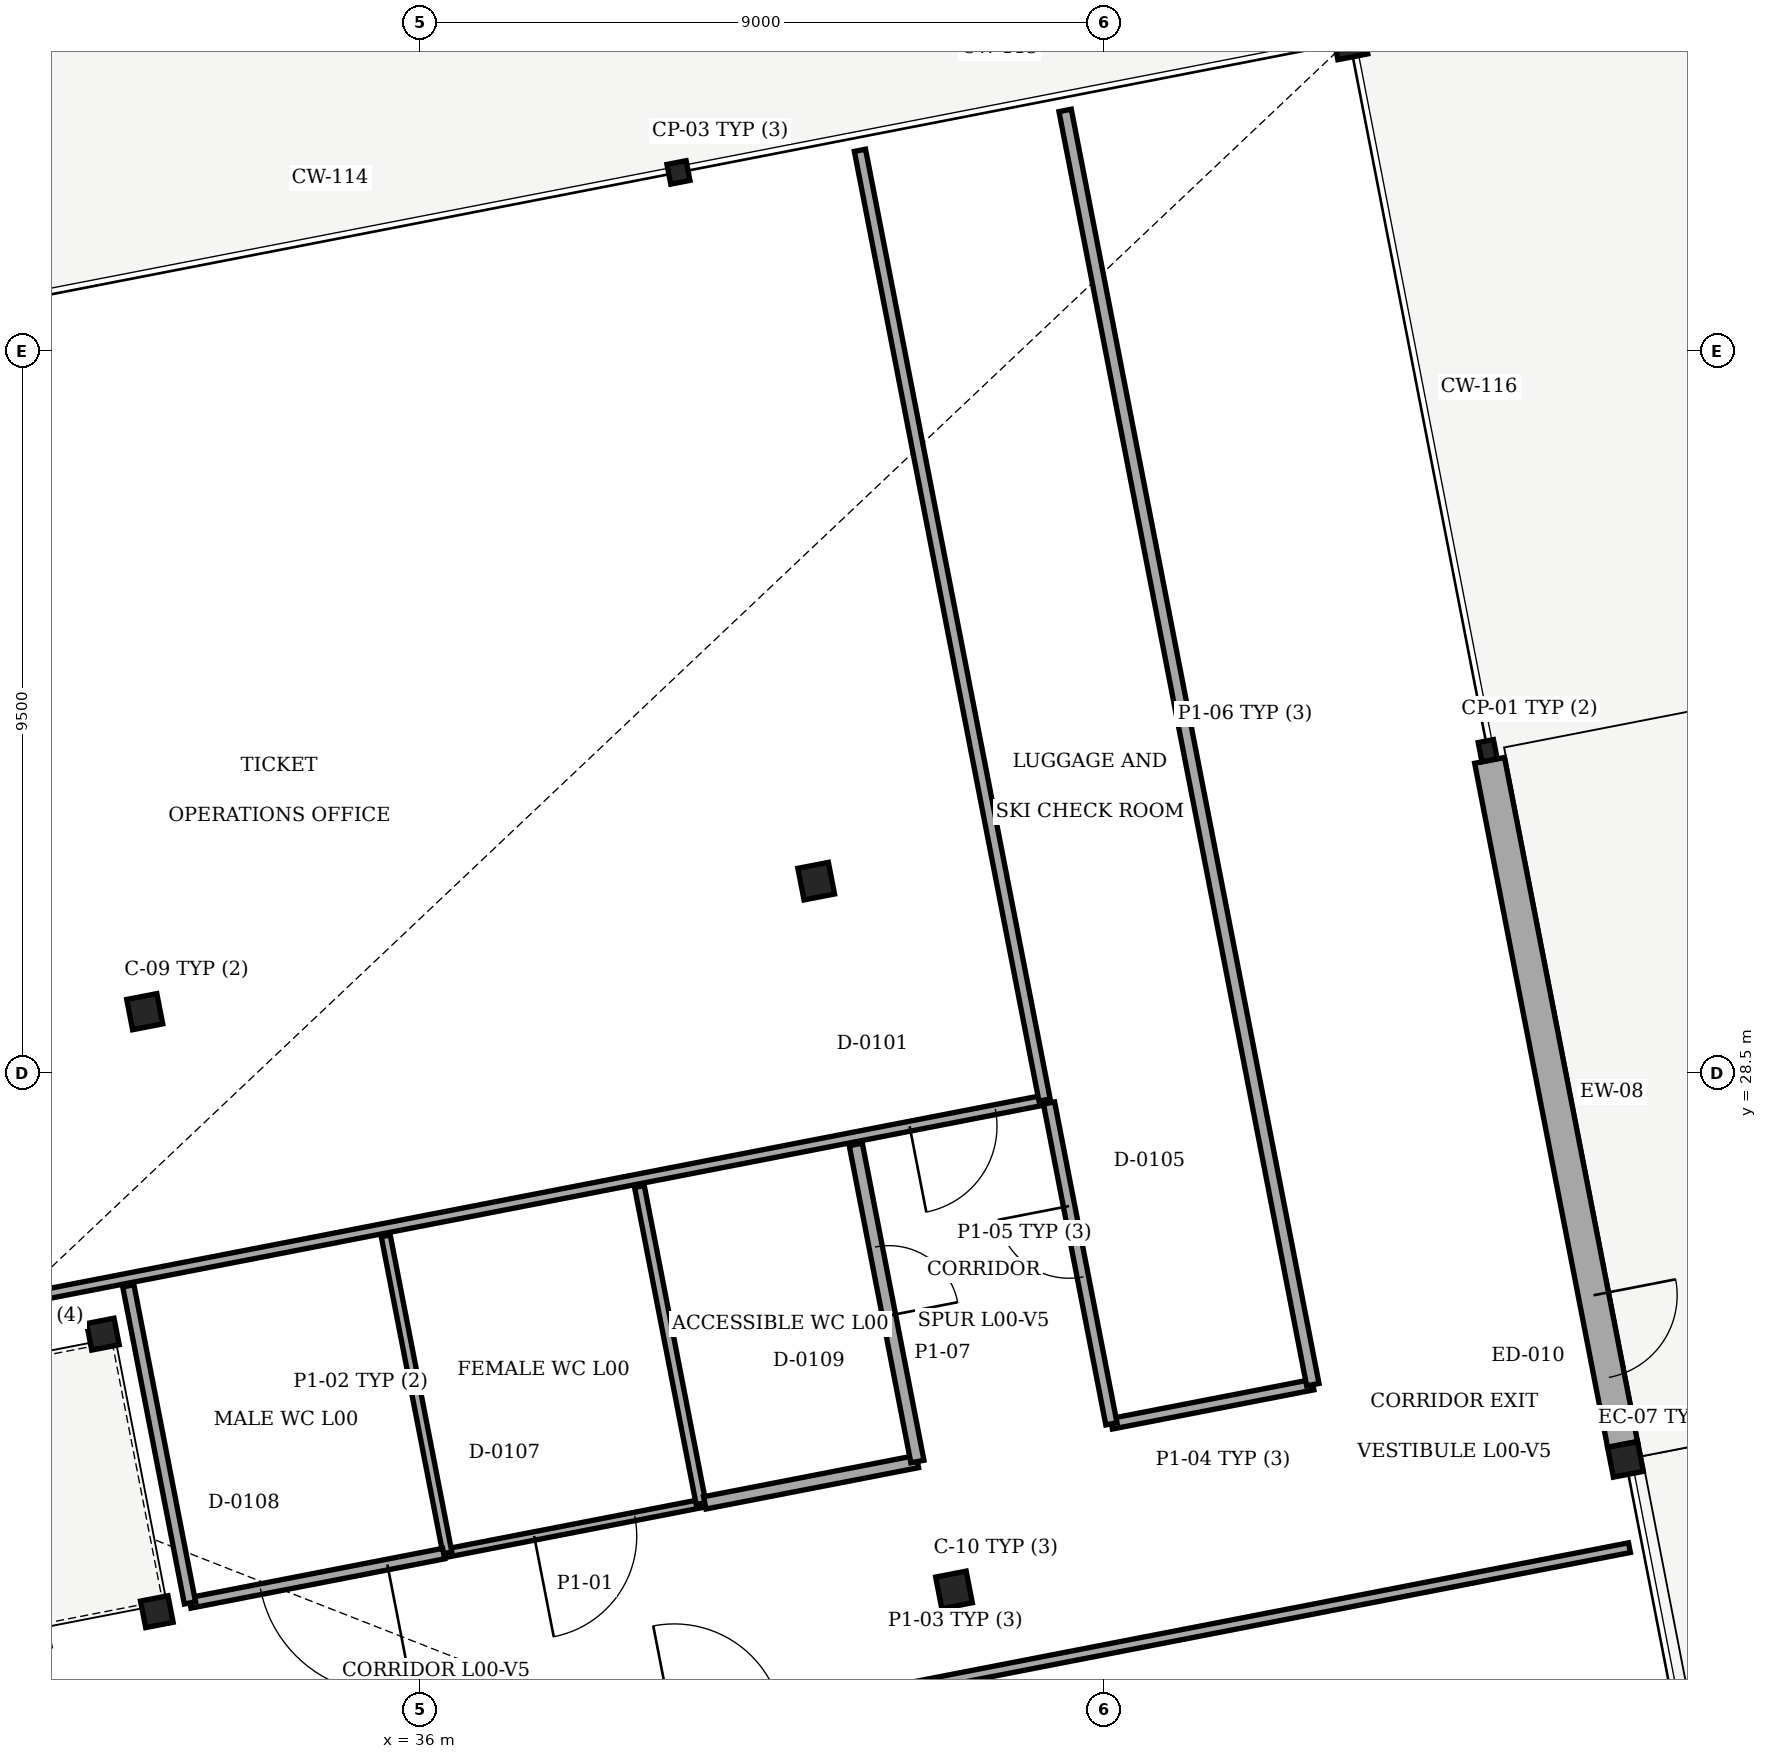
"""IFC4 building model, lengths in metres.
Left out: names, types, materials, properties, quantities, classifications, styles, units other than length and angle.
Written with IfcOpenShell. Run it as: python <this file> out.ifc"""

import sys

from ifc_helpers import new_model, si_unit, direction, frame, frame_2d, origin, origin_with_axes, origin_2d, place, context, subcontext, project, spatial, rectangle, i_section, extrude, element, fill, save


model = new_model("IFC4")
c1 = context("Model", 3, precision=1e-05, world=origin(), true_north=direction((0.0, 1.0)))
c2 = subcontext(c1, "Body", "Model", "MODEL_VIEW")
j1 = project(units=[si_unit("LENGTHUNIT", "METRE"), si_unit("PLANEANGLEUNIT", "RADIAN")], contexts=[c1])
p1 = place(None, origin())
s1 = spatial("IfcSite", under=j1, at=p1, CompositionType="ELEMENT")
p2 = place(p1, origin())
s2 = spatial("IfcBuilding", under=s1, at=p2, CompositionType="ELEMENT")
p3 = place(p2, origin())
s3 = spatial("IfcBuildingStorey", under=s2, at=p3, CompositionType="ELEMENT", Elevation=0.0)
p4 = place(p3, frame((32.379, 29.303, 0.0), z_axis=(0.0, 0.0, 1.0), x_axis=(0.981627183448, 0.190808995377, 0.0)))
e1 = element("IfcColumn", 1, at=p4, inside=s3, PredefinedType="COLUMN", context=c2, shape_type="SweptSolid", body=[
    extrude(i_section(OverallWidth=0.404, OverallDepth=0.406, WebThickness=0.027, FlangeThickness=0.044, FilletRadius=0.015, at=origin_2d()), origin(), (0.0, 0.0, 1.0), 4.8),
])
for number, where, z_axis, x_axis in (
    (2, (43.026, 21.695, 0.0), (0.0, 0.0, 1.0), (0.982, 0.191, 0.0)),
    (3, (41.213, 31.02, 0.0), (0.0, 0.0, 1.0), (0.982, 0.191, 0.0)),
):
    element("IfcColumn", number, at=place(p3, frame(where, z_axis=z_axis, x_axis=x_axis)), inside=s3, PredefinedType="COLUMN", context=c2, shape_type="SweptSolid", body=[
        extrude(i_section(OverallWidth=0.409, OverallDepth=0.424, WebThickness=0.033, FlangeThickness=0.052, FilletRadius=0.015, at=origin_2d()), origin(), (0.0, 0.0, 1.0), 4.8),
    ])
p5 = place(p3, frame((39.401, 40.345, 0.0), z_axis=(0.0, 0.0, 1.0), x_axis=(0.981627183448, 0.190808995377, 0.0)))
e4 = element("IfcColumn", 4, at=p5, inside=s3, PredefinedType="PILASTER", context=c2, shape_type="SweptSolid", body=[
    extrude(i_section(OverallWidth=0.257, OverallDepth=0.264, WebThickness=0.012, FlangeThickness=0.02, FilletRadius=0.009, at=origin_2d()), origin(), (0.0, 0.0, 1.0), 4.8),
])
p6 = place(p3, frame((51.861, 23.412, 0.0), z_axis=(0.0, 0.0, 1.0), x_axis=(0.981627183448, 0.190808995377, 0.0)))
e5 = element("IfcColumn", 5, at=p6, inside=s3, PredefinedType="COLUMN", context=c2, shape_type="SweptSolid", body=[
    extrude(i_section(OverallWidth=0.401, OverallDepth=0.399, WebThickness=0.025, FlangeThickness=0.04, FilletRadius=0.015, at=origin_2d()), origin(), (0.0, 0.0, 1.0), 4.8),
])
p7 = place(p3, frame((50.048, 32.737, 0.0), z_axis=(0.0, 0.0, 1.0), x_axis=(0.981627183448, 0.190808995377, 0.0)))
e6 = element("IfcColumn", 6, at=p7, inside=s3, PredefinedType="PILASTER", context=c2, shape_type="SweptSolid", body=[
    extrude(i_section(OverallWidth=0.204, OverallDepth=0.257, WebThickness=0.009, FlangeThickness=0.016, FilletRadius=0.009, at=origin_2d()), origin(), (0.0, 0.0, 1.0), 4.8),
])
p8 = place(p3, frame((48.235, 42.063, 0.0), z_axis=(0.0, 0.0, 1.0), x_axis=(0.981627183448, 0.190808995377, 0.0)))
e7 = element("IfcColumn", 7, at=p8, inside=s3, PredefinedType="COLUMN", context=c2, shape_type="SweptSolid", body=[
    extrude(i_section(OverallWidth=0.401, OverallDepth=0.399, WebThickness=0.025, FlangeThickness=0.04, FilletRadius=0.015, at=origin_2d()), origin(), (0.0, 0.0, 1.0), 4.8),
])
p9 = place(p3, frame((50.073, 32.609, 0.0), z_axis=(0.0, 0.0, 1.0), x_axis=(0.190802658427, -0.981628415205, 0.0)))
e8 = element("IfcWall", 8, at=p9, inside=s3, PredefinedType="SOLIDWALL", context=c2, shape_type="SweptSolid", body=[
    extrude(rectangle(XDim=9.168, YDim=0.4, at=frame_2d((4.584, 0.0))), origin(), (0.0, 0.0, 1.0), 3.4),
])
p10 = place(p9, frame((7.169, 0.0, 0.0)))
e9 = element("IfcOpeningElement", 9, at=p10, cuts=e8, PredefinedType="OPENING", context=c2, shape_type="SweptSolid", body=[
    extrude(rectangle(XDim=1.1, YDim=2.15, at=frame_2d((0.55, 1.075))), frame((0.0, 0.21, 0.0), z_axis=(0.0, -1.0, 0.0), x_axis=(1.0, 0.0, 0.0)), (0.0, 0.0, 1.0), 0.42),
])
for number, where, z_axis, x_axis in (
    (10, (32.538, 21.408, 0.0), (0.0, 0.0, 1.0), (0.982, 0.191, 0.0)),
    (11, (31.828, 25.06, 0.0), (0.0, 0.0, 1.0), (0.982, 0.191, 0.0)),
):
    element("IfcColumn", number, at=place(p3, frame(where, z_axis=z_axis, x_axis=x_axis)), inside=s3, PredefinedType="COLUMN", context=c2, shape_type="SweptSolid", body=[
        extrude(i_section(OverallWidth=0.368, OverallDepth=0.356, WebThickness=0.011, FlangeThickness=0.018, FilletRadius=0.015, at=origin_2d()), origin(), (0.0, 0.0, 1.0), 4.8),
    ])
p11 = place(p3, frame((44.218, 28.14, 0.0), z_axis=(0.0, 0.0, 1.0), x_axis=(-0.981627873079, -0.190805447496, 0.0)))
e12 = element("IfcWall", 12, at=p11, inside=s3, PredefinedType="PARTITIONING", context=c2, shape_type="SweptSolid", body=[
    extrude(rectangle(XDim=20.15, YDim=0.13, at=frame_2d((10.075, 0.0))), origin(), (0.0, 0.0, 1.0), 3.38),
])
p12 = place(p11, frame((0.659, 0.0, 0.0)))
e13 = element("IfcOpeningElement", 13, at=p12, cuts=e12, PredefinedType="OPENING", context=c2, shape_type="SweptSolid", body=[
    extrude(rectangle(XDim=1.15, YDim=2.15, at=frame_2d((0.575, 1.075))), frame((0.0, 0.075, 0.0), z_axis=(0.0, -1.0, 0.0), x_axis=(1.0, 0.0, 0.0)), (0.0, 0.0, 1.0), 0.15),
])
p13 = place(p3, frame((41.789, 40.636, 0.0), z_axis=(0.0, 0.0, 1.0), x_axis=(0.190806006341, -0.981627764453, 0.0)))
e14 = element("IfcWall", 14, at=p13, inside=s3, PredefinedType="PARTITIONING", context=c2, shape_type="SweptSolid", body=[
    extrude(rectangle(XDim=12.73, YDim=0.15, at=frame_2d((6.365, 0.0))), origin(), (0.0, 0.0, 1.0), 3.38),
])
p14 = place(p3, frame((34.46, 18.858, 0.0), z_axis=(0.0, 0.0, 1.0), x_axis=(0.981627322124, 0.190808281949, 0.0)))
e15 = element("IfcWall", 15, at=p14, inside=s3, PredefinedType="PARTITIONING", context=c2, shape_type="SweptSolid", body=[
    extrude(rectangle(XDim=17.78, YDim=0.13, at=frame_2d((8.89, 0.0))), origin(), (0.0, 0.0, 1.0), 3.38),
])
p15 = place(p14, frame((4.976, 0.0, 0.0)))
e16 = element("IfcOpeningElement", 16, at=p15, cuts=e15, PredefinedType="OPENING", context=c2, shape_type="SweptSolid", body=[
    extrude(rectangle(XDim=1.44, YDim=2.22, at=frame_2d((0.72, 1.11))), frame((0.0, 0.075, 0.0), z_axis=(0.0, -1.0, 0.0), x_axis=(1.0, 0.0, 0.0)), (0.0, 0.0, 1.0), 0.15),
])
p16 = place(p3, frame((47.747, 24.395, 0.0), z_axis=(0.0, 0.0, 1.0), x_axis=(-0.981630445883, -0.190792210834, 0.0)))
e17 = element("IfcWall", 17, at=p16, inside=s3, PredefinedType="PARTITIONING", context=c2, shape_type="SweptSolid", body=[
    extrude(rectangle(XDim=2.7, YDim=0.14, at=frame_2d((1.35, 0.0))), origin(), (0.0, 0.0, 1.0), 3.38),
])
p17 = place(p3, frame((45.097, 23.88, 0.0), z_axis=(0.0, 0.0, 1.0), x_axis=(-0.190828627284, 0.981623367188, 0.0)))
e18 = element("IfcWall", 18, at=p17, inside=s3, PredefinedType="PARTITIONING", context=c2, shape_type="SweptSolid", body=[
    extrude(rectangle(XDim=4.3, YDim=0.15, at=frame_2d((2.15, 0.0))), origin(), (0.0, 0.0, 1.0), 3.38),
])
p18 = place(p17, frame((1.969, 0.0, 0.0)))
e19 = element("IfcOpeningElement", 19, at=p18, cuts=e18, PredefinedType="OPENING", context=c2, shape_type="SweptSolid", body=[
    extrude(rectangle(XDim=0.95, YDim=2.15, at=frame_2d((0.475, 1.075))), frame((0.0, 0.085, 0.0), z_axis=(0.0, -1.0, 0.0), x_axis=(1.0, 0.0, 0.0)), (0.0, 0.0, 1.0), 0.17),
])
p19 = place(p3, frame((44.488, 41.161, 0.0), z_axis=(0.0, 0.0, 1.0), x_axis=(0.190808062504, -0.981627364779, 0.0)))
e20 = element("IfcWall", 20, at=p19, inside=s3, PredefinedType="PARTITIONING", context=c2, shape_type="SweptSolid", body=[
    extrude(rectangle(XDim=17.08, YDim=0.165, at=frame_2d((8.54, 0.0))), origin(), (0.0, 0.0, 1.0), 3.38),
])
p20 = place(p3, frame((39.698, 22.831, 0.0), z_axis=(0.0, 0.0, 1.0), x_axis=(-0.981616137106, -0.190865815101, 0.0)))
e21 = element("IfcWall", 21, at=p20, inside=s3, PredefinedType="PARTITIONING", context=c2, shape_type="SweptSolid", body=[
    extrude(rectangle(XDim=3.4, YDim=0.11, at=frame_2d((1.7, 0.0))), origin(), (0.0, 0.0, 1.0), 3.38),
])
p21 = place(p20, frame((0.887, 0.0, 0.0)))
e22 = element("IfcOpeningElement", 22, at=p21, cuts=e21, PredefinedType="OPENING", context=c2, shape_type="SweptSolid", body=[
    extrude(rectangle(XDim=1.35, YDim=2.2, at=frame_2d((0.675, 1.1))), frame((0.0, 0.065, 0.0), z_axis=(0.0, -1.0, 0.0), x_axis=(1.0, 0.0, 0.0)), (0.0, 0.0, 1.0), 0.13),
])
p22 = place(p3, frame((36.361, 22.182, 0.0), z_axis=(0.0, 0.0, 1.0), x_axis=(-0.190832757405, 0.981622564279, 0.0)))
e23 = element("IfcWall", 23, at=p22, inside=s3, PredefinedType="PARTITIONING", context=c2, shape_type="SweptSolid", body=[
    extrude(rectangle(XDim=4.25, YDim=0.12, at=frame_2d((2.125, 0.0))), origin(), (0.0, 0.0, 1.0), 3.38),
])
p23 = place(p3, frame((38.887, 27.002, 0.0), z_axis=(0.0, 0.0, 1.0), x_axis=(0.190832757405, -0.981622564279, 0.0)))
e24 = element("IfcWall", 24, at=p23, inside=s3, PredefinedType="PARTITIONING", context=c2, shape_type="SweptSolid", body=[
    extrude(rectangle(XDim=4.25, YDim=0.13, at=frame_2d((2.125, 0.0))), origin(), (0.0, 0.0, 1.0), 3.38),
])
p24 = place(p3, frame((36.311, 22.172, 0.0), z_axis=(0.0, 0.0, 1.0), x_axis=(-0.981629588591, -0.190796621572, 0.0)))
e25 = element("IfcWall", 25, at=p24, inside=s3, PredefinedType="PARTITIONING", context=c2, shape_type="SweptSolid", body=[
    extrude(rectangle(XDim=3.4, YDim=0.14, at=frame_2d((1.7, 0.0))), origin(), (0.0, 0.0, 1.0), 3.38),
])
p25 = place(p24, frame((0.754, 0.0, 0.0)))
e26 = element("IfcOpeningElement", 26, at=p25, cuts=e25, PredefinedType="OPENING", context=c2, shape_type="SweptSolid", body=[
    extrude(rectangle(XDim=1.7, YDim=2.2, at=frame_2d((0.85, 1.1))), frame((0.0, 0.08, 0.0), z_axis=(0.0, -1.0, 0.0), x_axis=(1.0, 0.0, 0.0)), (0.0, 0.0, 1.0), 0.16),
])
p26 = place(p3, frame((32.974, 21.523, 0.0), z_axis=(0.0, 0.0, 1.0), x_axis=(-0.190832757405, 0.981622564279, 0.0)))
e27 = element("IfcWall", 27, at=p26, inside=s3, PredefinedType="PARTITIONING", context=c2, shape_type="SweptSolid", body=[
    extrude(rectangle(XDim=4.25, YDim=0.15, at=frame_2d((2.125, 0.0))), origin(), (0.0, 0.0, 1.0), 3.38),
])
p27 = place(p3, frame((42.545, 23.384, 0.0), z_axis=(0.0, 0.0, 1.0), x_axis=(-0.981633664584, -0.190775649797, 0.0)))
e28 = element("IfcWall", 28, at=p27, inside=s3, PredefinedType="PARTITIONING", context=c2, shape_type="SweptSolid", body=[
    extrude(rectangle(XDim=2.85, YDim=0.165, at=frame_2d((1.425, 0.0))), origin(), (0.0, 0.0, 1.0), 3.38),
])
p28 = place(p3, frame((41.734, 27.556, 0.0), z_axis=(0.0, 0.0, 1.0), x_axis=(0.190777403342, -0.98163332379, 0.0)))
e29 = element("IfcWall", 29, at=p28, inside=s3, PredefinedType="PARTITIONING", context=c2, shape_type="SweptSolid", body=[
    extrude(rectangle(XDim=4.25, YDim=0.175, at=frame_2d((2.125, 0.0))), origin(), (0.0, 0.0, 1.0), 3.38),
])
p29 = place(p28, frame((1.373, 0.0, 0.0)))
e30 = element("IfcOpeningElement", 30, at=p29, cuts=e29, PredefinedType="OPENING", context=c2, shape_type="SweptSolid", body=[
    extrude(rectangle(XDim=0.92, YDim=2.12, at=frame_2d((0.46, 1.06))), frame((0.0, 0.098, 0.0), z_axis=(0.0, -1.0, 0.0), x_axis=(1.0, 0.0, 0.0)), (0.0, 0.0, 1.0), 0.195),
])
p30 = place(p10, origin_with_axes())
e31 = element("IfcDoor", 31, at=p30, inside=s3, OperationType="SINGLE_SWING_LEFT", PredefinedType="DOOR", context=c2, shape_type="SweptSolid", body=[
    extrude(rectangle(XDim=1.1, YDim=2.15, at=frame_2d((0.55, 1.075))), frame((0.0, 0.025, 0.0), z_axis=(0.0, -1.0, 0.0), x_axis=(1.0, 0.0, 0.0)), (0.0, 0.0, 1.0), 0.05),
])
fill(e9, e31)
p31 = place(p12, origin_with_axes())
e32 = element("IfcDoor", 32, at=p31, inside=s3, OperationType="SINGLE_SWING_RIGHT", PredefinedType="DOOR", context=c2, shape_type="SweptSolid", body=[
    extrude(rectangle(XDim=1.15, YDim=2.15, at=frame_2d((0.575, 1.075))), frame((0.0, 0.025, 0.0), z_axis=(0.0, -1.0, 0.0), x_axis=(1.0, 0.0, 0.0)), (0.0, 0.0, 1.0), 0.05),
])
fill(e13, e32)
p32 = place(p18, origin_with_axes())
e33 = element("IfcDoor", 33, at=p32, inside=s3, OperationType="SINGLE_SWING_RIGHT", PredefinedType="DOOR", context=c2, shape_type="SweptSolid", body=[
    extrude(rectangle(XDim=0.95, YDim=2.15, at=frame_2d((0.475, 1.075))), frame((0.0, 0.025, 0.0), z_axis=(0.0, -1.0, 0.0), x_axis=(1.0, 0.0, 0.0)), (0.0, 0.0, 1.0), 0.05),
])
fill(e19, e33)
p33 = place(p21, origin_with_axes())
e34 = element("IfcDoor", 34, at=p33, inside=s3, OperationType="SINGLE_SWING_RIGHT", PredefinedType="DOOR", context=c2, shape_type="SweptSolid", body=[
    extrude(rectangle(XDim=1.35, YDim=2.2, at=frame_2d((0.675, 1.1))), frame((0.0, 0.025, 0.0), z_axis=(0.0, -1.0, 0.0), x_axis=(1.0, 0.0, 0.0)), (0.0, 0.0, 1.0), 0.05),
])
fill(e22, e34)
p34 = place(p25, origin_with_axes())
e35 = element("IfcDoor", 35, at=p34, inside=s3, OperationType="DOUBLE_DOOR_SINGLE_SWING", PredefinedType="DOOR", context=c2, shape_type="SweptSolid", body=[
    extrude(rectangle(XDim=1.7, YDim=2.2, at=frame_2d((0.85, 1.1))), frame((0.0, 0.025, 0.0), z_axis=(0.0, -1.0, 0.0), x_axis=(1.0, 0.0, 0.0)), (0.0, 0.0, 1.0), 0.05),
])
fill(e26, e35)
p35 = place(p29, origin_with_axes())
e36 = element("IfcDoor", 36, at=p35, inside=s3, OperationType="SINGLE_SWING_RIGHT", PredefinedType="DOOR", context=c2, shape_type="SweptSolid", body=[
    extrude(rectangle(XDim=0.92, YDim=2.12, at=frame_2d((0.46, 1.06))), frame((0.0, 0.025, 0.0), z_axis=(0.0, -1.0, 0.0), x_axis=(1.0, 0.0, 0.0)), (0.0, 0.0, 1.0), 0.05),
])
fill(e30, e36)
save(model, sys.argv[1])
